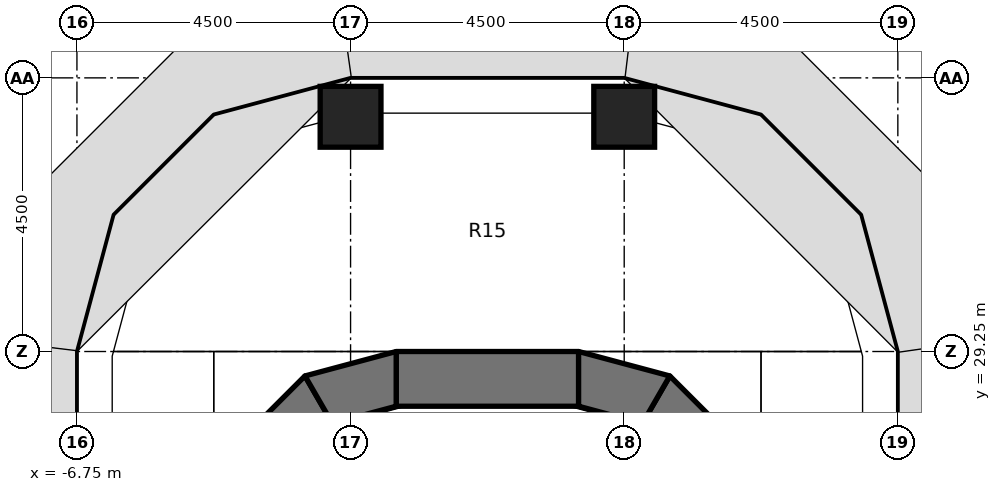
"""IFC4 building model, lengths in metres.
Left out: names, types, materials, properties, quantities, classifications, styles, units other than length and angle.
Written with IfcOpenShell. Run it as: python <this file> out.ifc"""

import sys

from ifc_helpers import new_model, si_unit, direction, frame, frame_2d, origin, origin_2d, place, context, subcontext, project, spatial, polyline, rectangle, outline, extrude, element, save


model = new_model("IFC4")
c1 = context("Model", 3, precision=1e-05, world=origin(), true_north=direction((0.0, 1.0)))
c2 = subcontext(c1, "Body", "Model", "MODEL_VIEW")
j1 = project(units=[si_unit("LENGTHUNIT", "METRE"), si_unit("PLANEANGLEUNIT", "RADIAN")], contexts=[c1])
p1 = place(None, origin())
s1 = spatial("IfcSite", under=j1, at=p1, CompositionType="ELEMENT")
p2 = place(p1, origin())
s2 = spatial("IfcBuilding", under=s1, at=p2, CompositionType="ELEMENT")
p3 = place(p2, frame((0.0, 0.0, 69.0)))
s3 = spatial("IfcBuildingStorey", under=s2, at=p3, CompositionType="ELEMENT", Elevation=69.0)
for number, where, z_axis, x_axis in (
    (1, (-2.25, 33.11, 0.0), (0.0, 0.0, 1.0), (1.0, 0.0, 0.0)),
    (2, (2.25, 33.11, 0.0), (0.0, 0.0, 1.0), (1.0, 0.0, 0.0)),
):
    element("IfcColumn", number, at=place(p3, frame(where, z_axis=z_axis, x_axis=x_axis)), inside=s3, PredefinedType="COLUMN", context=c2, shape_type="SweptSolid", body=[
        extrude(rectangle(XDim=1.0, YDim=1.0, at=origin_2d()), origin(), (0.0, 0.0, 1.0), 4.05),
    ])
p4 = place(p3, frame((-1.5, 28.8, 0.0), z_axis=(0.0, 0.0, 1.0), x_axis=(1.0, 0.0, 0.0)))
e3 = element("IfcWall", 3, at=p4, inside=s3, PredefinedType="SHEAR", context=c2, shape_type="SweptSolid", body=[
    extrude(rectangle(XDim=3.0, YDim=0.9, at=frame_2d((1.5, 0.0))), origin(), (0.0, 0.0, 1.0), 4.2),
])
p5 = place(p3, origin())
e4 = element("IfcWall", 4, at=p5, inside=s3, PredefinedType="SHEAR", context=c2, shape_type="SweptSolid", body=[
    extrude(outline(polyline([(-4.098, 27.75), (-3.0, 28.848), (-2.55, 28.069), (-3.319, 27.3), (-4.098, 27.75)])), origin(), (0.0, 0.0, 1.0), 4.2),
])
p6 = place(p3, origin())
e5 = element("IfcWall", 5, at=p6, inside=s3, PredefinedType="SHEAR", context=c2, shape_type="SweptSolid", body=[
    extrude(outline(polyline([(-3.0, 28.848), (-1.5, 29.25), (-1.5, 28.35), (-2.55, 28.069), (-3.0, 28.848)])), origin(), (0.0, 0.0, 1.0), 4.2),
])
p7 = place(p3, origin())
e6 = element("IfcWall", 6, at=p7, inside=s3, PredefinedType="SHEAR", context=c2, shape_type="SweptSolid", body=[
    extrude(outline(polyline([(4.098, 27.75), (3.0, 28.848), (2.55, 28.069), (3.319, 27.3), (4.098, 27.75)])), origin(), (0.0, 0.0, 1.0), 4.2),
])
p8 = place(p3, origin())
e7 = element("IfcWall", 7, at=p8, inside=s3, PredefinedType="SHEAR", context=c2, shape_type="SweptSolid", body=[
    extrude(outline(polyline([(3.0, 28.848), (1.5, 29.25), (1.5, 28.35), (2.55, 28.069), (3.0, 28.848)])), origin(), (0.0, 0.0, 1.0), 4.2),
])
save(model, sys.argv[1])
